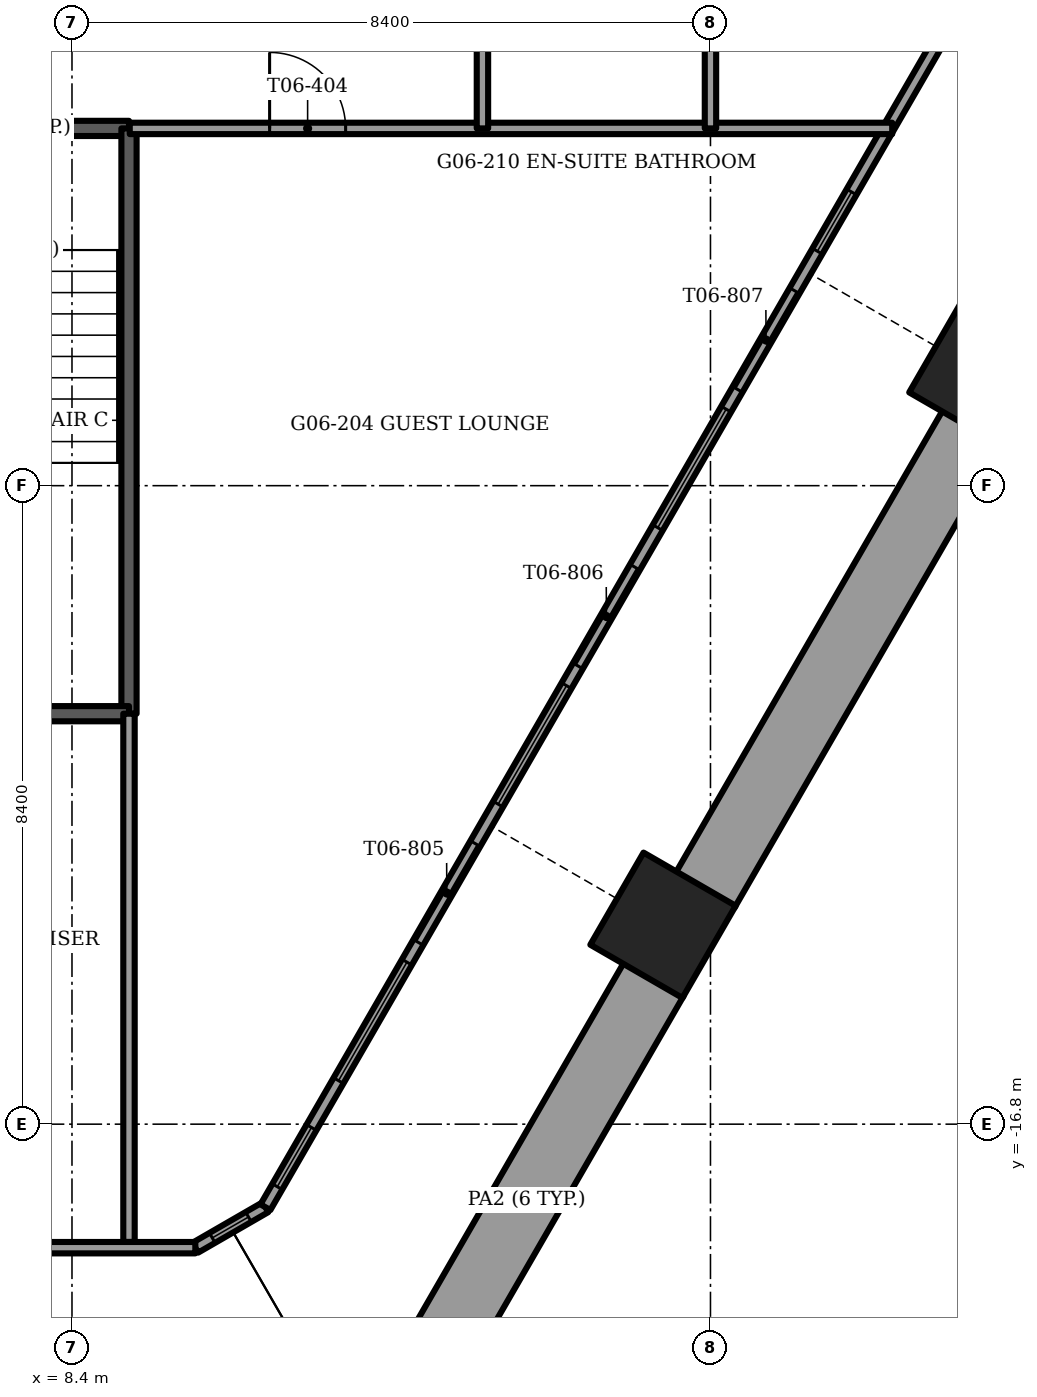
"""IFC4 building model, lengths in metres.
Left out: names, types, materials, properties, quantities, classifications, styles, units other than length and angle.
Written with IfcOpenShell. Run it as: python <this file> out.ifc"""

import sys

from ifc_helpers import new_model, si_unit, direction, frame, frame_2d, origin, origin_2d, place, context, subcontext, project, spatial, rectangle, extrude, element, fill, save


model = new_model("IFC4")
c1 = context("Model", 3, precision=1e-05, world=origin(), true_north=direction((0.0, 1.0)))
c2 = subcontext(c1, "Body", "Model", "MODEL_VIEW")
j1 = project(units=[si_unit("LENGTHUNIT", "METRE"), si_unit("PLANEANGLEUNIT", "RADIAN")], contexts=[c1])
p1 = place(None, origin())
s1 = spatial("IfcSite", under=j1, at=p1, CompositionType="ELEMENT")
p2 = place(p1, origin())
s2 = spatial("IfcBuilding", under=s1, at=p2, CompositionType="ELEMENT")
p3 = place(p2, frame((0.0, 0.0, 28.0)))
s3 = spatial("IfcBuildingStorey", under=s2, at=p3, CompositionType="ELEMENT", Elevation=28.0)
for number, where, z_axis, x_axis in (
    (1, (16.175, -14.183, -1.2), (0.0, 0.0, 1.0), (-0.5, -0.866, 0.0)),
    (2, (20.371, -6.917, -1.2), (0.0, 0.0, 1.0), (-0.5, -0.866, 0.0)),
):
    element("IfcColumn", number, at=place(p3, frame(where, z_axis=z_axis, x_axis=x_axis)), inside=s3, PredefinedType="COLUMN", context=c2, shape_type="SweptSolid", body=[
        extrude(rectangle(XDim=1.4, YDim=1.4, at=origin_2d()), origin(), (0.0, 0.0, 1.0), 3.75),
    ])
p4 = place(p3, frame((12.705, -20.694, 0.0), z_axis=(0.0, 0.0, 1.0), x_axis=(0.500005133765, 0.866022439784, 0.0)))
e3 = element("IfcWall", 3, at=p4, inside=s3, PredefinedType="PARAPET", context=c2, shape_type="SweptSolid", body=[
    extrude(rectangle(XDim=6.704, YDim=0.9, at=frame_2d((3.352, 0.0))), origin(), (0.0, 0.0, 1.0), 1.1),
])
p5 = place(p3, frame((16.727, -13.728, 0.0), z_axis=(0.0, 0.0, 1.0), x_axis=(0.499997206141, 0.866027016814, 0.0)))
e4 = element("IfcWall", 4, at=p5, inside=s3, PredefinedType="PARAPET", context=c2, shape_type="SweptSolid", body=[
    extrude(rectangle(XDim=7.051, YDim=0.9, at=frame_2d((3.525, 0.0))), origin(), (0.0, 0.0, 1.0), 1.1),
])
p6 = place(p3, frame((-10.023, -18.425, 0.0), z_axis=(0.0, 0.0, 1.0), x_axis=(1.0, 0.0, 0.0)))
e5 = element("IfcWall", 5, at=p6, inside=s3, PredefinedType="SOLIDWALL", context=c2, shape_type="SweptSolid", body=[
    extrude(rectangle(XDim=20.045, YDim=0.15, at=frame_2d((10.023, 0.0))), origin(), (0.0, 0.0, 1.0), 3.45),
])
p7 = place(p6, frame((4.573, 0.0, 0.15)))
e6 = element("IfcOpeningElement", 6, at=p7, cuts=e5, PredefinedType="OPENING", context=c2, shape_type="SweptSolid", body=[
    extrude(rectangle(XDim=0.9, YDim=2.85, at=frame_2d((0.45, 1.425))), frame((0.0, 0.075, 0.0), z_axis=(0.0, -1.0, 0.0), x_axis=(1.0, 0.0, 0.0)), (0.0, 0.0, 1.0), 0.15),
])
p8 = place(p6, frame((2.373, 0.0, 0.15)))
e7 = element("IfcOpeningElement", 7, at=p8, cuts=e5, PredefinedType="OPENING", context=c2, shape_type="SweptSolid", body=[
    extrude(rectangle(XDim=1.5, YDim=2.85, at=frame_2d((0.75, 1.425))), frame((0.0, 0.075, 0.0), z_axis=(0.0, -1.0, 0.0), x_axis=(1.0, 0.0, 0.0)), (0.0, 0.0, 1.0), 0.15),
])
p9 = place(p6, frame((6.123, 0.0, 0.15)))
e8 = element("IfcOpeningElement", 8, at=p9, cuts=e5, PredefinedType="OPENING", context=c2, shape_type="SweptSolid", body=[
    extrude(rectangle(XDim=1.8, YDim=2.85, at=frame_2d((0.9, 1.425))), frame((0.0, 0.075, 0.0), z_axis=(0.0, -1.0, 0.0), x_axis=(1.0, 0.0, 0.0)), (0.0, 0.0, 1.0), 0.15),
])
p10 = place(p6, frame((8.173, 0.0, 0.15)))
e9 = element("IfcOpeningElement", 9, at=p10, cuts=e5, PredefinedType="OPENING", context=c2, shape_type="SweptSolid", body=[
    extrude(rectangle(XDim=1.5, YDim=2.85, at=frame_2d((0.75, 1.425))), frame((0.0, 0.075, 0.0), z_axis=(0.0, -1.0, 0.0), x_axis=(1.0, 0.0, 0.0)), (0.0, 0.0, 1.0), 0.15),
])
p11 = place(p6, frame((10.373, 0.0, 0.15)))
e10 = element("IfcOpeningElement", 10, at=p11, cuts=e5, PredefinedType="OPENING", context=c2, shape_type="SweptSolid", body=[
    extrude(rectangle(XDim=1.8, YDim=2.85, at=frame_2d((0.9, 1.425))), frame((0.0, 0.075, 0.0), z_axis=(0.0, -1.0, 0.0), x_axis=(1.0, 0.0, 0.0)), (0.0, 0.0, 1.0), 0.15),
])
p12 = place(p6, frame((12.423, 0.0, 0.0)))
e11 = element("IfcOpeningElement", 11, at=p12, cuts=e5, PredefinedType="OPENING", context=c2, shape_type="SweptSolid", body=[
    extrude(rectangle(XDim=1.5, YDim=2.4, at=frame_2d((0.75, 1.2))), frame((0.0, 0.075, 0.0), z_axis=(0.0, -1.0, 0.0), x_axis=(1.0, 0.0, 0.0)), (0.0, 0.0, 1.0), 0.15),
])
p13 = place(p6, frame((16.173, 0.0, 0.15)))
e12 = element("IfcOpeningElement", 12, at=p13, cuts=e5, PredefinedType="OPENING", context=c2, shape_type="SweptSolid", body=[
    extrude(rectangle(XDim=1.8, YDim=2.85, at=frame_2d((0.9, 1.425))), frame((0.0, 0.075, 0.0), z_axis=(0.0, -1.0, 0.0), x_axis=(1.0, 0.0, 0.0)), (0.0, 0.0, 1.0), 0.15),
])
p14 = place(p3, frame((10.945, -17.893, 0.0), z_axis=(0.0, 0.0, 1.0), x_axis=(0.500003237297, 0.866023534722, 0.0)))
e13 = element("IfcWall", 13, at=p14, inside=s3, PredefinedType="SOLIDWALL", context=c2, shape_type="SweptSolid", body=[
    extrude(rectangle(XDim=20.046, YDim=0.15, at=frame_2d((10.023, 0.0))), origin(), (0.0, 0.0, 1.0), 3.45),
])
p15 = place(p14, frame((1.923, 0.0, 0.15)))
e14 = element("IfcOpeningElement", 14, at=p15, cuts=e13, PredefinedType="OPENING", context=c2, shape_type="SweptSolid", body=[
    extrude(rectangle(XDim=1.8, YDim=2.85, at=frame_2d((0.9, 1.425))), frame((0.0, 0.075, 0.0), z_axis=(0.0, -1.0, 0.0), x_axis=(1.0, 0.0, 0.0)), (0.0, 0.0, 1.0), 0.15),
])
p16 = place(p14, frame((4.023, 0.0, 0.0)))
e15 = element("IfcOpeningElement", 15, at=p16, cuts=e13, PredefinedType="OPENING", context=c2, shape_type="SweptSolid", body=[
    extrude(rectangle(XDim=1.5, YDim=2.4, at=frame_2d((0.75, 1.2))), frame((0.0, 0.075, 0.0), z_axis=(0.0, -1.0, 0.0), x_axis=(1.0, 0.0, 0.0)), (0.0, 0.0, 1.0), 0.15),
])
p17 = place(p14, frame((6.123, 0.0, 0.15)))
e16 = element("IfcOpeningElement", 16, at=p17, cuts=e13, PredefinedType="OPENING", context=c2, shape_type="SweptSolid", body=[
    extrude(rectangle(XDim=1.8, YDim=2.85, at=frame_2d((0.9, 1.425))), frame((0.0, 0.075, 0.0), z_axis=(0.0, -1.0, 0.0), x_axis=(1.0, 0.0, 0.0)), (0.0, 0.0, 1.0), 0.15),
])
p18 = place(p14, frame((8.223, 0.0, 0.0)))
e17 = element("IfcOpeningElement", 17, at=p18, cuts=e13, PredefinedType="OPENING", context=c2, shape_type="SweptSolid", body=[
    extrude(rectangle(XDim=1.5, YDim=2.4, at=frame_2d((0.75, 1.2))), frame((0.0, 0.075, 0.0), z_axis=(0.0, -1.0, 0.0), x_axis=(1.0, 0.0, 0.0)), (0.0, 0.0, 1.0), 0.15),
])
p19 = place(p14, frame((10.323, 0.0, 0.15)))
e18 = element("IfcOpeningElement", 18, at=p19, cuts=e13, PredefinedType="OPENING", context=c2, shape_type="SweptSolid", body=[
    extrude(rectangle(XDim=1.8, YDim=2.85, at=frame_2d((0.9, 1.425))), frame((0.0, 0.075, 0.0), z_axis=(0.0, -1.0, 0.0), x_axis=(1.0, 0.0, 0.0)), (0.0, 0.0, 1.0), 0.15),
])
p20 = place(p14, frame((12.423, 0.0, 0.0)))
e19 = element("IfcOpeningElement", 19, at=p20, cuts=e13, PredefinedType="OPENING", context=c2, shape_type="SweptSolid", body=[
    extrude(rectangle(XDim=1.5, YDim=2.4, at=frame_2d((0.75, 1.2))), frame((0.0, 0.075, 0.0), z_axis=(0.0, -1.0, 0.0), x_axis=(1.0, 0.0, 0.0)), (0.0, 0.0, 1.0), 0.15),
])
p21 = place(p14, frame((14.523, 0.0, 0.15)))
e20 = element("IfcOpeningElement", 20, at=p21, cuts=e13, PredefinedType="OPENING", context=c2, shape_type="SweptSolid", body=[
    extrude(rectangle(XDim=0.9, YDim=2.85, at=frame_2d((0.45, 1.425))), frame((0.0, 0.075, 0.0), z_axis=(0.0, -1.0, 0.0), x_axis=(1.0, 0.0, 0.0)), (0.0, 0.0, 1.0), 0.15),
])
p22 = place(p14, frame((0.311, 0.0, 0.15)))
e21 = element("IfcOpeningElement", 21, at=p22, cuts=e13, PredefinedType="OPENING", context=c2, shape_type="SweptSolid", body=[
    extrude(rectangle(XDim=0.9, YDim=2.73, at=frame_2d((0.45, 1.365))), frame((0.0, 0.075, 0.0), z_axis=(0.0, -1.0, 0.0), x_axis=(1.0, 0.0, 0.0)), (0.0, 0.0, 1.0), 0.15),
])
p23 = place(p14, frame((18.834, 0.0, 0.15)))
e22 = element("IfcOpeningElement", 22, at=p23, cuts=e13, PredefinedType="OPENING", context=c2, shape_type="SweptSolid", body=[
    extrude(rectangle(XDim=0.9, YDim=2.73, at=frame_2d((0.45, 1.365))), frame((0.0, 0.075, 0.0), z_axis=(0.0, -1.0, 0.0), x_axis=(1.0, 0.0, 0.0)), (0.0, 0.0, 1.0), 0.15),
])
p24 = place(p3, frame((10.023, -18.425, 0.0), z_axis=(0.0, 0.0, 1.0), x_axis=(0.866048165231, 0.499960573946, 0.0)))
e23 = element("IfcWall", 23, at=p24, inside=s3, PredefinedType="SOLIDWALL", context=c2, shape_type="SweptSolid", body=[
    extrude(rectangle(XDim=1.065, YDim=0.15, at=frame_2d((0.532, 0.0))), origin(), (0.0, 0.0, 1.0), 3.45),
])
p25 = place(p24, frame((0.258, 0.0, 0.15)))
e24 = element("IfcOpeningElement", 24, at=p25, cuts=e23, PredefinedType="OPENING", context=c2, shape_type="SweptSolid", body=[
    extrude(rectangle(XDim=0.55, YDim=2.85, at=frame_2d((0.275, 1.425))), frame((0.0, 0.075, 0.0), z_axis=(0.0, -1.0, 0.0), x_axis=(1.0, 0.0, 0.0)), (0.0, 0.0, 1.0), 0.15),
])
p26 = place(p3, frame((5.8, -3.7, -0.3), z_axis=(0.0, 0.0, 1.0), x_axis=(1.0, 0.0, 0.0)))
e25 = element("IfcWall", 25, at=p26, inside=s3, PredefinedType="SOLIDWALL", context=c2, shape_type="SweptSolid", body=[
    extrude(rectangle(XDim=3.35, YDim=0.2, at=frame_2d((1.675, 0.0))), origin(), (0.0, 0.0, 1.0), 3.75),
])
p27 = place(p26, frame((1.125, 0.0, 0.0)))
e26 = element("IfcOpeningElement", 26, at=p27, cuts=e25, PredefinedType="OPENING", context=c2, shape_type="SweptSolid", body=[
    extrude(rectangle(XDim=1.1, YDim=2.1, at=frame_2d((0.55, 1.05))), frame((0.0, 0.1, 0.0), z_axis=(0.0, -1.0, 0.0), x_axis=(1.0, 0.0, 0.0)), (0.0, 0.0, 1.0), 0.2),
])
p28 = place(p3, frame((9.15, -3.7, -0.3), z_axis=(0.0, 0.0, 1.0), x_axis=(0.0, -1.0, 0.0)))
e27 = element("IfcWall", 27, at=p28, inside=s3, PredefinedType="SOLIDWALL", context=c2, shape_type="SweptSolid", body=[
    extrude(rectangle(XDim=7.7, YDim=0.2, at=frame_2d((3.85, 0.0))), origin(), (0.0, 0.0, 1.0), 3.75),
])
p29 = place(p3, frame((5.8, -11.4, -0.3), z_axis=(0.0, 0.0, 1.0), x_axis=(1.0, 0.0, 0.0)))
e28 = element("IfcWall", 28, at=p29, inside=s3, PredefinedType="SOLIDWALL", context=c2, shape_type="SweptSolid", body=[
    extrude(rectangle(XDim=3.35, YDim=0.2, at=frame_2d((1.675, 0.0))), origin(), (0.0, 0.0, 1.0), 3.75),
])
p30 = place(p3, frame((9.15, -11.4, 0.0), z_axis=(0.0, 0.0, 1.0), x_axis=(0.0, -1.0, 0.0)))
e29 = element("IfcWall", 29, at=p30, inside=s3, PredefinedType="PARTITIONING", context=c2, shape_type="SweptSolid", body=[
    extrude(rectangle(XDim=6.95, YDim=0.15, at=frame_2d((3.475, 0.0))), origin(), (0.0, 0.0, 1.0), 3.45),
])
p31 = place(p3, frame((9.16, -3.7, 0.0), z_axis=(0.0, 0.0, 1.0), x_axis=(1.0, 0.0, 0.0)))
e30 = element("IfcWall", 30, at=p31, inside=s3, PredefinedType="PARTITIONING", context=c2, shape_type="SweptSolid", body=[
    extrude(rectangle(XDim=10.031, YDim=0.15, at=frame_2d((5.016, 0.0))), origin(), (0.0, 0.0, 1.0), 3.45),
])
p32 = place(p31, frame((1.84, 0.0, 0.0)))
e31 = element("IfcOpeningElement", 31, at=p32, cuts=e30, PredefinedType="OPENING", context=c2, shape_type="SweptSolid", body=[
    extrude(rectangle(XDim=1.0, YDim=2.1, at=frame_2d((0.5, 1.05))), frame((0.0, 0.075, 0.0), z_axis=(0.0, -1.0, 0.0), x_axis=(1.0, 0.0, 0.0)), (0.0, 0.0, 1.0), 0.15),
])
p33 = place(p3, frame((16.8, -3.7, 0.0), z_axis=(0.0, 0.0, 1.0), x_axis=(0.0, 1.0, 0.0)))
e32 = element("IfcWall", 32, at=p33, inside=s3, PredefinedType="PARTITIONING", context=c2, shape_type="SweptSolid", body=[
    extrude(rectangle(XDim=2.8, YDim=0.15, at=frame_2d((1.4, 0.0))), origin(), (0.0, 0.0, 1.0), 3.45),
])
p34 = place(p3, frame((13.8, -3.7, 0.0), z_axis=(0.0, 0.0, 1.0), x_axis=(0.0, 1.0, 0.0)))
e33 = element("IfcWall", 33, at=p34, inside=s3, PredefinedType="PARTITIONING", context=c2, shape_type="SweptSolid", body=[
    extrude(rectangle(XDim=16.738, YDim=0.15, at=frame_2d((8.369, 0.0))), origin(), (0.0, 0.0, 1.0), 3.45),
])
p35 = place(p34, frame((2.95, 0.0, 0.0)))
e34 = element("IfcOpeningElement", 34, at=p35, cuts=e33, PredefinedType="OPENING", context=c2, shape_type="SweptSolid", body=[
    extrude(rectangle(XDim=1.0, YDim=2.1, at=frame_2d((0.5, 1.05))), frame((0.0, 0.075, 0.0), z_axis=(0.0, -1.0, 0.0), x_axis=(1.0, 0.0, 0.0)), (0.0, 0.0, 1.0), 0.15),
])
p36 = place(p34, frame((10.0, 0.0, 0.0)))
e35 = element("IfcOpeningElement", 35, at=p36, cuts=e33, PredefinedType="OPENING", context=c2, shape_type="SweptSolid", body=[
    extrude(rectangle(XDim=1.0, YDim=2.1, at=frame_2d((0.5, 1.05))), frame((0.0, 0.075, 0.0), z_axis=(0.0, -1.0, 0.0), x_axis=(1.0, 0.0, 0.0)), (0.0, 0.0, 1.0), 0.15),
])
p37 = place(p34, frame((14.047, 0.0, 0.0)))
e36 = element("IfcOpeningElement", 36, at=p37, cuts=e33, PredefinedType="OPENING", context=c2, shape_type="SweptSolid", body=[
    extrude(rectangle(XDim=1.0, YDim=2.1, at=frame_2d((0.5, 1.05))), frame((0.0, 0.075, 0.0), z_axis=(0.0, -1.0, 0.0), x_axis=(1.0, 0.0, 0.0)), (0.0, 0.0, 1.0), 0.15),
])
p38 = place(p15, origin())
e37 = element("IfcWindow", 37, at=p38, inside=s3, PartitioningType="SINGLE_PANEL", PredefinedType="WINDOW", context=c2, shape_type="SweptSolid", body=[
    extrude(rectangle(XDim=1.8, YDim=2.85, at=frame_2d((0.9, 1.425))), frame((0.0, 0.03, 0.0), z_axis=(0.0, -1.0, 0.0), x_axis=(1.0, 0.0, 0.0)), (0.0, 0.0, 1.0), 0.06),
])
fill(e14, e37)
p39 = place(p16, origin())
e38 = element("IfcDoor", 38, at=p39, inside=s3, OperationType="SLIDING_TO_LEFT", PredefinedType="DOOR", context=c2, shape_type="SweptSolid", body=[
    extrude(rectangle(XDim=1.5, YDim=2.4, at=frame_2d((0.75, 1.2))), frame((0.0, 0.025, 0.0), z_axis=(0.0, -1.0, 0.0), x_axis=(1.0, 0.0, 0.0)), (0.0, 0.0, 1.0), 0.05),
])
fill(e15, e38)
p40 = place(p17, origin())
e39 = element("IfcWindow", 39, at=p40, inside=s3, PartitioningType="SINGLE_PANEL", PredefinedType="WINDOW", context=c2, shape_type="SweptSolid", body=[
    extrude(rectangle(XDim=1.8, YDim=2.85, at=frame_2d((0.9, 1.425))), frame((0.0, 0.03, 0.0), z_axis=(0.0, -1.0, 0.0), x_axis=(1.0, 0.0, 0.0)), (0.0, 0.0, 1.0), 0.06),
])
fill(e16, e39)
p41 = place(p18, origin())
e40 = element("IfcDoor", 40, at=p41, inside=s3, OperationType="SLIDING_TO_RIGHT", PredefinedType="DOOR", context=c2, shape_type="SweptSolid", body=[
    extrude(rectangle(XDim=1.5, YDim=2.4, at=frame_2d((0.75, 1.2))), frame((0.0, 0.025, 0.0), z_axis=(0.0, -1.0, 0.0), x_axis=(1.0, 0.0, 0.0)), (0.0, 0.0, 1.0), 0.05),
])
fill(e17, e40)
p42 = place(p19, origin())
e41 = element("IfcWindow", 41, at=p42, inside=s3, PartitioningType="SINGLE_PANEL", PredefinedType="WINDOW", context=c2, shape_type="SweptSolid", body=[
    extrude(rectangle(XDim=1.8, YDim=2.85, at=frame_2d((0.9, 1.425))), frame((0.0, 0.03, 0.0), z_axis=(0.0, -1.0, 0.0), x_axis=(1.0, 0.0, 0.0)), (0.0, 0.0, 1.0), 0.06),
])
fill(e18, e41)
p43 = place(p20, origin())
e42 = element("IfcDoor", 42, at=p43, inside=s3, OperationType="SLIDING_TO_LEFT", PredefinedType="DOOR", context=c2, shape_type="SweptSolid", body=[
    extrude(rectangle(XDim=1.5, YDim=2.4, at=frame_2d((0.75, 1.2))), frame((0.0, 0.025, 0.0), z_axis=(0.0, -1.0, 0.0), x_axis=(1.0, 0.0, 0.0)), (0.0, 0.0, 1.0), 0.05),
])
fill(e19, e42)
p44 = place(p21, origin())
e43 = element("IfcWindow", 43, at=p44, inside=s3, PartitioningType="SINGLE_PANEL", PredefinedType="WINDOW", context=c2, shape_type="SweptSolid", body=[
    extrude(rectangle(XDim=0.9, YDim=2.85, at=frame_2d((0.45, 1.425))), frame((0.0, 0.03, 0.0), z_axis=(0.0, -1.0, 0.0), x_axis=(1.0, 0.0, 0.0)), (0.0, 0.0, 1.0), 0.06),
])
fill(e20, e43)
p45 = place(p22, origin())
e44 = element("IfcWindow", 44, at=p45, inside=s3, PartitioningType="SINGLE_PANEL", PredefinedType="WINDOW", context=c2, shape_type="SweptSolid", body=[
    extrude(rectangle(XDim=0.9, YDim=2.73, at=frame_2d((0.45, 1.365))), frame((0.0, 0.03, 0.0), z_axis=(0.0, -1.0, 0.0), x_axis=(1.0, 0.0, 0.0)), (0.0, 0.0, 1.0), 0.06),
])
fill(e21, e44)
p46 = place(p25, origin())
e45 = element("IfcWindow", 45, at=p46, inside=s3, PartitioningType="SINGLE_PANEL", PredefinedType="WINDOW", context=c2, shape_type="SweptSolid", body=[
    extrude(rectangle(XDim=0.55, YDim=2.85, at=frame_2d((0.275, 1.425))), frame((0.0, 0.03, 0.0), z_axis=(0.0, -1.0, 0.0), x_axis=(1.0, 0.0, 0.0)), (0.0, 0.0, 1.0), 0.06),
])
fill(e24, e45)
p47 = place(p32, origin())
e46 = element("IfcDoor", 46, at=p47, inside=s3, OperationType="SINGLE_SWING_LEFT", PredefinedType="DOOR", context=c2, shape_type="SweptSolid", body=[
    extrude(rectangle(XDim=1.0, YDim=2.1, at=frame_2d((0.5, 1.05))), frame((0.0, 0.025, 0.0), z_axis=(0.0, -1.0, 0.0), x_axis=(1.0, 0.0, 0.0)), (0.0, 0.0, 1.0), 0.05),
])
fill(e31, e46)
save(model, sys.argv[1])
